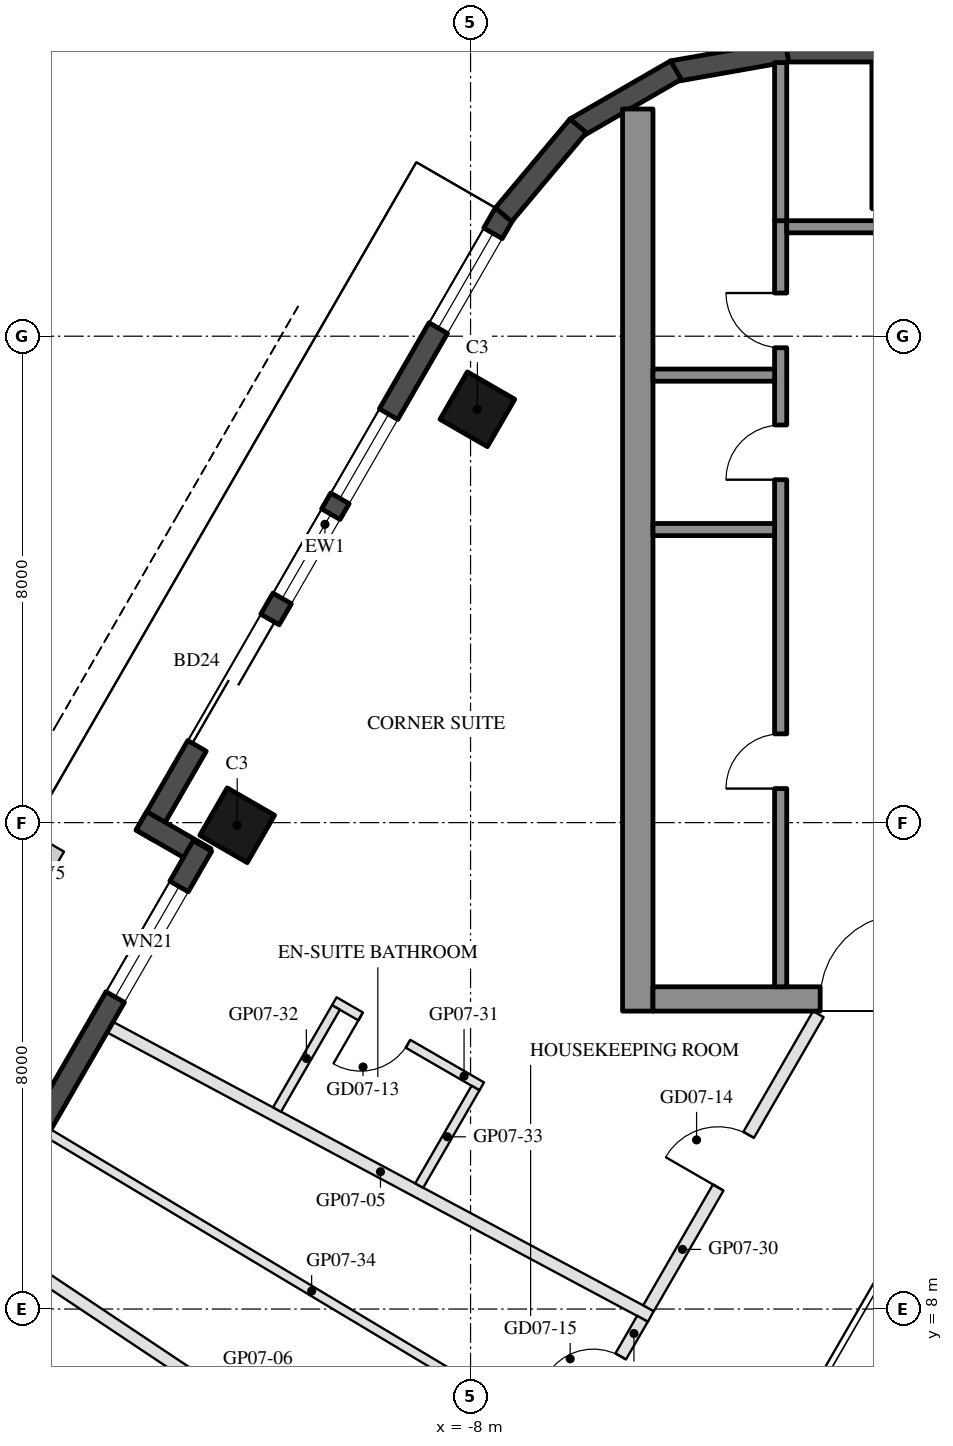
"""IFC4 building model, lengths in metres.
Left out: names, types, materials, properties, quantities, classifications, styles, units other than length and angle.
Written with IfcOpenShell. Run it as: python <this file> out.ifc"""

import sys

from ifc_helpers import new_model, si_unit, direction, frame, frame_2d, origin, origin_2d, place, context, subcontext, project, spatial, rectangle, hollow_rectangle, extrude, element, fill, save


model = new_model("IFC4")
c1 = context("Model", 3, precision=1e-05, world=origin(), true_north=direction((0.0, 1.0)))
c2 = subcontext(c1, "Body", "Model", "MODEL_VIEW")
j1 = project(units=[si_unit("LENGTHUNIT", "METRE"), si_unit("PLANEANGLEUNIT", "RADIAN")], contexts=[c1])
p1 = place(None, origin())
s1 = spatial("IfcSite", under=j1, at=p1, CompositionType="ELEMENT")
p2 = place(p1, origin())
s2 = spatial("IfcBuilding", under=s1, at=p2, CompositionType="ELEMENT")
p3 = place(p2, frame((0.0, 0.0, 94.6)))
s3 = spatial("IfcBuildingStorey", under=s2, at=p3, CompositionType="ELEMENT", Elevation=94.6)
for number, where, z_axis, x_axis in (
    (1, (-7.888, 22.798, 0.0), (0.0, 0.0, 1.0), (0.5, 0.866, 0.0)),
    (2, (-11.838, 15.957, 0.0), (0.0, 0.0, 1.0), (0.5, 0.866, 0.0)),
):
    element("IfcColumn", number, at=place(p3, frame(where, z_axis=z_axis, x_axis=x_axis)), inside=s3, PredefinedType="COLUMN", context=c2, shape_type="SweptSolid", body=[
        extrude(hollow_rectangle(XDim=0.9, YDim=0.9, WallThickness=0.04, at=origin_2d()), origin(), (0.0, 0.0, 1.0), 3.7),
    ])
p4 = place(p3, frame((0.0, 27.3, 0.0), z_axis=(0.0, 0.0, 1.0), x_axis=(1.0, 0.0, 0.0)))
e3 = element("IfcColumn", 3, at=p4, inside=s3, PredefinedType="COLUMN", context=c2, shape_type="SweptSolid", body=[
    extrude(hollow_rectangle(XDim=2.8, YDim=2.4, WallThickness=0.07, at=origin_2d()), origin(), (0.0, 0.0, 1.0), 3.7),
])
p5 = place(p3, frame((-7.441, 26.022, 0.0), z_axis=(0.0, 0.0, 1.0), x_axis=(-0.499992533062, -0.86602971478, 0.0)))
e4 = element("IfcWall", 4, at=p5, inside=s3, PredefinedType="SOLIDWALL", context=c2, shape_type="SweptSolid", body=[
    extrude(rectangle(XDim=11.816, YDim=0.35, at=frame_2d((5.908, 0.0))), origin(), (0.0, 0.0, 1.0), 3.55),
])
p6 = place(p5, frame((0.381, 0.0, 0.3)))
e5 = element("IfcOpeningElement", 5, at=p6, cuts=e4, PredefinedType="OPENING", context=c2, shape_type="SweptSolid", body=[
    extrude(rectangle(XDim=1.8, YDim=2.65, at=frame_2d((0.9, 1.325))), frame((0.0, 0.185, 0.0), z_axis=(0.0, -1.0, 0.0), x_axis=(1.0, 0.0, 0.0)), (0.0, 0.0, 1.0), 0.37),
])
p7 = place(p5, frame((7.716, 0.0, 0.0)))
e6 = element("IfcOpeningElement", 6, at=p7, cuts=e4, PredefinedType="OPENING", context=c2, shape_type="SweptSolid", body=[
    extrude(rectangle(XDim=2.4, YDim=2.4, at=frame_2d((1.2, 1.2))), frame((0.0, 0.185, 0.0), z_axis=(0.0, -1.0, 0.0), x_axis=(1.0, 0.0, 0.0)), (0.0, 0.0, 1.0), 0.37),
])
p8 = place(p5, frame((3.815, 0.0, 0.3)))
e7 = element("IfcOpeningElement", 7, at=p8, cuts=e4, PredefinedType="OPENING", context=c2, shape_type="SweptSolid", body=[
    extrude(rectangle(XDim=1.6, YDim=2.65, at=frame_2d((0.8, 1.325))), frame((0.0, 0.185, 0.0), z_axis=(0.0, -1.0, 0.0), x_axis=(1.0, 0.0, 0.0)), (0.0, 0.0, 1.0), 0.37),
])
p9 = place(p5, frame((5.715, 0.0, 0.3)))
e8 = element("IfcOpeningElement", 8, at=p9, cuts=e4, PredefinedType="OPENING", context=c2, shape_type="SweptSolid", body=[
    extrude(rectangle(XDim=1.6, YDim=2.65, at=frame_2d((0.8, 1.325))), frame((0.0, 0.185, 0.0), z_axis=(0.0, -1.0, 0.0), x_axis=(1.0, 0.0, 0.0)), (0.0, 0.0, 1.0), 0.37),
])
p10 = place(p3, frame((-13.413, 16.029, 0.0), z_axis=(0.0, 0.0, 1.0), x_axis=(0.866005645448, -0.500034220881, 0.0)))
e9 = element("IfcWall", 9, at=p10, inside=s3, PredefinedType="SOLIDWALL", context=c2, shape_type="SweptSolid", body=[
    extrude(rectangle(XDim=1.22, YDim=0.35, at=frame_2d((0.61, 0.0))), origin(), (0.0, 0.0, 1.0), 3.55),
])
p11 = place(p3, frame((-12.409, 15.617, 0.0), z_axis=(0.0, 0.0, 1.0), x_axis=(-0.500003597184, -0.866023326939, 0.0)))
e10 = element("IfcWall", 10, at=p11, inside=s3, PredefinedType="SOLIDWALL", context=c2, shape_type="SweptSolid", body=[
    extrude(rectangle(XDim=6.74, YDim=0.35, at=frame_2d((3.37, 0.0))), origin(), (0.0, 0.0, 1.0), 3.55),
])
p12 = place(p11, frame((0.77, 0.0, 0.3)))
e11 = element("IfcOpeningElement", 11, at=p12, cuts=e10, PredefinedType="OPENING", context=c2, shape_type="SweptSolid", body=[
    extrude(rectangle(XDim=2.1, YDim=2.65, at=frame_2d((1.05, 1.325))), frame((0.0, 0.185, 0.0), z_axis=(0.0, -1.0, 0.0), x_axis=(1.0, 0.0, 0.0)), (0.0, 0.0, 1.0), 0.37),
])
p13 = place(p3, frame((2.829, 28.685, 0.0), z_axis=(0.0, 0.0, 1.0), x_axis=(-1.0, 0.0, 0.0)))
e12 = element("IfcWall", 12, at=p13, inside=s3, PredefinedType="SOLIDWALL", context=c2, shape_type="SweptSolid", body=[
    extrude(rectangle(XDim=5.658, YDim=0.35, at=frame_2d((2.829, 0.0))), origin(), (0.0, 0.0, 1.0), 3.55),
])
for number, where, z_axis, x_axis in (
    (13, (-2.799, 28.688, 0.0), (0.0, 0.0, 1.0), (-0.985, -0.174, 0.0)),
    (14, (-4.623, 28.377, 0.0), (0.0, 0.0, 1.0), (-0.866, -0.5, 0.0)),
):
    element("IfcWall", number, at=place(p3, frame(where, z_axis=z_axis, x_axis=x_axis)), inside=s3, PredefinedType="SOLIDWALL", context=c2, shape_type="SweptSolid", body=[
        extrude(rectangle(XDim=1.91, YDim=0.35, at=frame_2d((0.955, 0.0))), origin(), (0.0, 0.0, 1.0), 3.55),
    ])
p14 = place(p3, frame((-6.23, 27.461, 0.0), z_axis=(0.0, 0.0, 1.0), x_axis=(-0.642808304945, -0.766027077259, 0.0)))
e15 = element("IfcWall", 15, at=p14, inside=s3, PredefinedType="SOLIDWALL", context=c2, shape_type="SweptSolid", body=[
    extrude(rectangle(XDim=1.91, YDim=0.35, at=frame_2d((0.955, 0.0))), origin(), (0.0, 0.0, 1.0), 3.55),
])
p15 = place(p3, frame((-5.25, 12.9, 0.0), z_axis=(0.0, 0.0, 1.0), x_axis=(0.0, 1.0, 0.0)))
e16 = element("IfcWall", 16, at=p15, inside=s3, PredefinedType="SHEAR", context=c2, shape_type="SweptSolid", body=[
    extrude(rectangle(XDim=14.837, YDim=0.5, at=frame_2d((7.418, 0.0))), origin(), (0.0, 0.0, 1.0), 3.5),
])
p16 = place(p3, frame((5.0, 13.1, 0.0), z_axis=(0.0, 0.0, 1.0), x_axis=(-1.0, 0.0, 0.0)))
e17 = element("IfcWall", 17, at=p16, inside=s3, PredefinedType="SHEAR", context=c2, shape_type="SweptSolid", body=[
    extrude(rectangle(XDim=10.0, YDim=0.4, at=frame_2d((5.0, 0.0))), origin(), (0.0, 0.0, 1.0), 3.5),
])
p17 = place(p16, frame((3.55, 0.0, 0.0)))
e18 = element("IfcOpeningElement", 18, at=p17, cuts=e17, PredefinedType="OPENING", context=c2, shape_type="SweptSolid", body=[
    extrude(rectangle(XDim=1.1, YDim=2.1, at=frame_2d((0.55, 1.05))), frame((0.0, 0.21, 0.0), z_axis=(0.0, -1.0, 0.0), x_axis=(1.0, 0.0, 0.0)), (0.0, 0.0, 1.0), 0.42),
])
p18 = place(p16, frame((5.85, 0.0, 0.0)))
e19 = element("IfcOpeningElement", 19, at=p18, cuts=e17, PredefinedType="OPENING", context=c2, shape_type="SweptSolid", body=[
    extrude(rectangle(XDim=1.4, YDim=2.1, at=frame_2d((0.7, 1.05))), frame((0.0, 0.21, 0.0), z_axis=(0.0, -1.0, 0.0), x_axis=(1.0, 0.0, 0.0)), (0.0, 0.0, 1.0), 0.42),
])
p19 = place(p3, frame((-2.9, 13.3, 0.0), z_axis=(0.0, 0.0, 1.0), x_axis=(0.0, 1.0, 0.0)))
e20 = element("IfcWall", 20, at=p19, inside=s3, PredefinedType="SHEAR", context=c2, shape_type="SweptSolid", body=[
    extrude(rectangle(XDim=12.6, YDim=0.2, at=frame_2d((6.3, 0.0))), origin(), (0.0, 0.0, 1.0), 3.5),
])
p20 = place(p19, frame((3.26, 0.0, 0.0)))
e21 = element("IfcOpeningElement", 21, at=p20, cuts=e20, PredefinedType="OPENING", context=c2, shape_type="SweptSolid", body=[
    extrude(rectangle(XDim=0.9, YDim=2.1, at=frame_2d((0.45, 1.05))), frame((0.0, 0.11, 0.0), z_axis=(0.0, -1.0, 0.0), x_axis=(1.0, 0.0, 0.0)), (0.0, 0.0, 1.0), 0.22),
])
p21 = place(p19, frame((8.34, 0.0, 0.0)))
e22 = element("IfcOpeningElement", 22, at=p21, cuts=e20, PredefinedType="OPENING", context=c2, shape_type="SweptSolid", body=[
    extrude(rectangle(XDim=0.9, YDim=2.1, at=frame_2d((0.45, 1.05))), frame((0.0, 0.11, 0.0), z_axis=(0.0, -1.0, 0.0), x_axis=(1.0, 0.0, 0.0)), (0.0, 0.0, 1.0), 0.22),
])
p22 = place(p19, frame((10.51, 0.0, 0.0)))
e23 = element("IfcOpeningElement", 23, at=p22, cuts=e20, PredefinedType="OPENING", context=c2, shape_type="SweptSolid", body=[
    extrude(rectangle(XDim=0.9, YDim=2.1, at=frame_2d((0.45, 1.05))), frame((0.0, 0.11, 0.0), z_axis=(0.0, -1.0, 0.0), x_axis=(1.0, 0.0, 0.0)), (0.0, 0.0, 1.0), 0.22),
])
p23 = place(p3, frame((-0.4, 25.8, 0.0), z_axis=(0.0, 0.0, 1.0), x_axis=(-1.0, 0.0, 0.0)))
e24 = element("IfcWall", 24, at=p23, inside=s3, PredefinedType="SHEAR", context=c2, shape_type="SweptSolid", body=[
    extrude(rectangle(XDim=2.4, YDim=0.2, at=frame_2d((1.2, 0.0))), origin(), (0.0, 0.0, 1.0), 3.5),
])
for number, where, z_axis, x_axis in (
    (25, (-3.0, 20.82, 0.0), (0.0, 0.0, 1.0), (-1.0, 0.0, 0.0)),
    (26, (-3.0, 23.36, 0.0), (0.0, 0.0, 1.0), (-1.0, 0.0, 0.0)),
):
    element("IfcWall", number, at=place(p3, frame(where, z_axis=z_axis, x_axis=x_axis)), inside=s3, PredefinedType="SHEAR", context=c2, shape_type="SweptSolid", body=[
        extrude(rectangle(XDim=2.0, YDim=0.2, at=frame_2d((1.0, 0.0))), origin(), (0.0, 0.0, 1.0), 3.5),
    ])
p24 = place(p3, frame((-2.9, 25.9, 0.0), z_axis=(0.0, 0.0, 1.0), x_axis=(0.0, 1.0, 0.0)))
e27 = element("IfcWall", 27, at=p24, inside=s3, PredefinedType="SHEAR", context=c2, shape_type="SweptSolid", body=[
    extrude(rectangle(XDim=2.6, YDim=0.2, at=frame_2d((1.3, 0.0))), origin(), (0.0, 0.0, 1.0), 3.5),
])
p25 = place(p3, frame((-13.928, 12.636, 0.0), z_axis=(0.0, 0.0, 1.0), x_axis=(0.881791431821, -0.471639555981, 0.0)))
e28 = element("IfcWall", 28, at=p25, inside=s3, PredefinedType="PARTITIONING", context=c2, shape_type="SweptSolid", body=[
    extrude(rectangle(XDim=10.085, YDim=0.2, at=frame_2d((5.042, 0.0))), origin(), (0.0, 0.0, 1.0), 2.95),
])
p26 = place(p3, frame((-15.447, 8.806, 0.0), z_axis=(0.0, 0.0, 1.0), x_axis=(0.831801127359, -0.55507376494, 0.0)))
e29 = element("IfcWall", 29, at=p26, inside=s3, PredefinedType="PARTITIONING", context=c2, shape_type="SweptSolid", body=[
    extrude(rectangle(XDim=9.5, YDim=0.2, at=frame_2d((4.75, 0.0))), origin(), (0.0, 0.0, 1.0), 2.95),
])
p27 = place(p3, frame((-5.073, 8.013, 0.0), z_axis=(0.0, 0.0, 1.0), x_axis=(0.500003731568, 0.866023249352, 0.0)))
e30 = element("IfcWall", 30, at=p27, inside=s3, PredefinedType="PARTITIONING", context=c2, shape_type="SweptSolid", body=[
    extrude(rectangle(XDim=5.585, YDim=0.2, at=frame_2d((2.792, 0.0))), origin(), (0.0, 0.0, 1.0), 2.95),
])
p28 = place(p27, frame((2.292, 0.0, 0.0)))
e31 = element("IfcOpeningElement", 31, at=p28, cuts=e30, PredefinedType="OPENING", context=c2, shape_type="SweptSolid", body=[
    extrude(rectangle(XDim=1.0, YDim=2.1, at=frame_2d((0.5, 1.05))), frame((0.0, 0.11, 0.0), z_axis=(0.0, -1.0, 0.0), x_axis=(1.0, 0.0, 0.0)), (0.0, 0.0, 1.0), 0.22),
])
p29 = place(p3, frame((-7.816, 11.662, 0.0), z_axis=(0.0, 0.0, 1.0), x_axis=(-0.865996816683, 0.500049511043, 0.0)))
e32 = element("IfcWall", 32, at=p29, inside=s3, PredefinedType="PARTITIONING", context=c2, shape_type="SweptSolid", body=[
    extrude(rectangle(XDim=2.8, YDim=0.15, at=frame_2d((1.4, 0.0))), origin(), (0.0, 0.0, 1.0), 3.55),
])
p30 = place(p29, frame((1.4, 0.0, 0.0)))
e33 = element("IfcOpeningElement", 33, at=p30, cuts=e32, PredefinedType="OPENING", context=c2, shape_type="SweptSolid", body=[
    extrude(rectangle(XDim=0.9, YDim=2.1, at=frame_2d((0.45, 1.05))), frame((0.0, 0.085, 0.0), z_axis=(0.0, -1.0, 0.0), x_axis=(1.0, 0.0, 0.0)), (0.0, 0.0, 1.0), 0.17),
])
p31 = place(p3, frame((-10.213, 12.96, 0.0), z_axis=(0.0, 0.0, 1.0), x_axis=(-0.500013181875, -0.866017793092, 0.0)))
e34 = element("IfcWall", 34, at=p31, inside=s3, PredefinedType="PARTITIONING", context=c2, shape_type="SweptSolid", body=[
    extrude(rectangle(XDim=1.938, YDim=0.15, at=frame_2d((0.969, 0.0))), origin(), (0.0, 0.0, 1.0), 3.55),
])
p32 = place(p3, frame((-7.918, 11.635, 0.0), z_axis=(0.0, 0.0, 1.0), x_axis=(-0.499924019097, -0.866069266935, 0.0)))
e35 = element("IfcWall", 35, at=p32, inside=s3, PredefinedType="PARTITIONING", context=c2, shape_type="SweptSolid", body=[
    extrude(rectangle(XDim=1.852, YDim=0.15, at=frame_2d((0.926, 0.0))), origin(), (0.0, 0.0, 1.0), 3.55),
])
p33 = place(p3, frame((-14.937, 10.888, 0.0), z_axis=(0.0, 0.0, 1.0), x_axis=(0.857798338883, -0.513986390685, 0.0)))
e36 = element("IfcWall", 36, at=p33, inside=s3, PredefinedType="PARTITIONING", context=c2, shape_type="SweptSolid", body=[
    extrude(rectangle(XDim=10.081, YDim=0.15, at=frame_2d((5.041, 0.0))), origin(), (0.0, 0.0, 1.0), 2.96),
])
p34 = place(p3, frame((-6.338, 5.823, 0.0), z_axis=(0.0, 0.0, 1.0), x_axis=(0.499982502246, 0.866035505882, 0.0)))
e37 = element("IfcWall", 37, at=p34, inside=s3, PredefinedType="PARTITIONING", context=c2, shape_type="SweptSolid", body=[
    extrude(rectangle(XDim=2.33, YDim=0.2, at=frame_2d((1.165, 0.0))), origin(), (0.0, 0.0, 1.0), 2.95),
])
p35 = place(p34, frame((0.715, 0.0, 0.0)))
e38 = element("IfcOpeningElement", 38, at=p35, cuts=e37, PredefinedType="OPENING", context=c2, shape_type="SweptSolid", body=[
    extrude(rectangle(XDim=0.9, YDim=2.1, at=frame_2d((0.45, 1.05))), frame((0.0, 0.11, 0.0), z_axis=(0.0, -1.0, 0.0), x_axis=(1.0, 0.0, 0.0)), (0.0, 0.0, 1.0), 0.22),
])
p36 = place(p6, origin())
e39 = element("IfcWindow", 39, at=p36, inside=s3, PartitioningType="SINGLE_PANEL", PredefinedType="WINDOW", context=c2, shape_type="SweptSolid", body=[
    extrude(rectangle(XDim=1.8, YDim=2.65, at=frame_2d((0.9, 1.325))), frame((0.0, 0.03, 0.0), z_axis=(0.0, -1.0, 0.0), x_axis=(1.0, 0.0, 0.0)), (0.0, 0.0, 1.0), 0.06),
])
fill(e5, e39)
p37 = place(p7, frame((2.4, 0.0, 0.0), z_axis=(0.0, 0.0, 1.0), x_axis=(-1.0, 0.0, 0.0)))
e40 = element("IfcDoor", 40, at=p37, inside=s3, OperationType="SLIDING_TO_LEFT", PredefinedType="DOOR", context=c2, shape_type="SweptSolid", body=[
    extrude(rectangle(XDim=2.4, YDim=2.4, at=frame_2d((1.2, 1.2))), frame((0.0, 0.025, 0.0), z_axis=(0.0, -1.0, 0.0), x_axis=(1.0, 0.0, 0.0)), (0.0, 0.0, 1.0), 0.05),
])
fill(e6, e40)
p38 = place(p8, origin())
e41 = element("IfcWindow", 41, at=p38, inside=s3, PartitioningType="SINGLE_PANEL", PredefinedType="WINDOW", context=c2, shape_type="SweptSolid", body=[
    extrude(rectangle(XDim=1.6, YDim=2.65, at=frame_2d((0.8, 1.325))), frame((0.0, 0.03, 0.0), z_axis=(0.0, -1.0, 0.0), x_axis=(1.0, 0.0, 0.0)), (0.0, 0.0, 1.0), 0.06),
])
fill(e7, e41)
p39 = place(p9, origin())
e42 = element("IfcWindow", 42, at=p39, inside=s3, PartitioningType="SINGLE_PANEL", PredefinedType="WINDOW", context=c2, shape_type="SweptSolid", body=[
    extrude(rectangle(XDim=1.6, YDim=2.65, at=frame_2d((0.8, 1.325))), frame((0.0, 0.03, 0.0), z_axis=(0.0, -1.0, 0.0), x_axis=(1.0, 0.0, 0.0)), (0.0, 0.0, 1.0), 0.06),
])
fill(e8, e42)
p40 = place(p12, origin())
e43 = element("IfcWindow", 43, at=p40, inside=s3, PartitioningType="SINGLE_PANEL", PredefinedType="WINDOW", context=c2, shape_type="SweptSolid", body=[
    extrude(rectangle(XDim=2.1, YDim=2.65, at=frame_2d((1.05, 1.325))), frame((0.0, 0.03, 0.0), z_axis=(0.0, -1.0, 0.0), x_axis=(1.0, 0.0, 0.0)), (0.0, 0.0, 1.0), 0.06),
])
fill(e11, e43)
p41 = place(p20, origin())
e44 = element("IfcDoor", 44, at=p41, inside=s3, OperationType="SINGLE_SWING_LEFT", PredefinedType="DOOR", context=c2, shape_type="SweptSolid", body=[
    extrude(rectangle(XDim=0.9, YDim=2.1, at=frame_2d((0.45, 1.05))), frame((0.0, 0.025, 0.0), z_axis=(0.0, -1.0, 0.0), x_axis=(1.0, 0.0, 0.0)), (0.0, 0.0, 1.0), 0.05),
])
fill(e21, e44)
p42 = place(p21, origin())
e45 = element("IfcDoor", 45, at=p42, inside=s3, OperationType="SINGLE_SWING_LEFT", PredefinedType="DOOR", context=c2, shape_type="SweptSolid", body=[
    extrude(rectangle(XDim=0.9, YDim=2.1, at=frame_2d((0.45, 1.05))), frame((0.0, 0.025, 0.0), z_axis=(0.0, -1.0, 0.0), x_axis=(1.0, 0.0, 0.0)), (0.0, 0.0, 1.0), 0.05),
])
fill(e22, e45)
p43 = place(p22, origin())
e46 = element("IfcDoor", 46, at=p43, inside=s3, OperationType="SINGLE_SWING_RIGHT", PredefinedType="DOOR", context=c2, shape_type="SweptSolid", body=[
    extrude(rectangle(XDim=0.9, YDim=2.1, at=frame_2d((0.45, 1.05))), frame((0.0, 0.025, 0.0), z_axis=(0.0, -1.0, 0.0), x_axis=(1.0, 0.0, 0.0)), (0.0, 0.0, 1.0), 0.05),
])
fill(e23, e46)
p44 = place(p18, frame((1.4, 0.0, 0.0), z_axis=(0.0, 0.0, 1.0), x_axis=(-1.0, 0.0, 0.0)))
e47 = element("IfcDoor", 47, at=p44, inside=s3, OperationType="DOUBLE_DOOR_SINGLE_SWING", PredefinedType="DOOR", context=c2, shape_type="SweptSolid", body=[
    extrude(rectangle(XDim=1.4, YDim=2.1, at=frame_2d((0.7, 1.05))), frame((0.0, 0.025, 0.0), z_axis=(0.0, -1.0, 0.0), x_axis=(1.0, 0.0, 0.0)), (0.0, 0.0, 1.0), 0.05),
])
fill(e19, e47)
p45 = place(p30, origin())
e48 = element("IfcDoor", 48, at=p45, inside=s3, OperationType="SINGLE_SWING_RIGHT", PredefinedType="DOOR", context=c2, shape_type="SweptSolid", body=[
    extrude(rectangle(XDim=0.9, YDim=2.1, at=frame_2d((0.45, 1.05))), frame((0.0, 0.025, 0.0), z_axis=(0.0, -1.0, 0.0), x_axis=(1.0, 0.0, 0.0)), (0.0, 0.0, 1.0), 0.05),
])
fill(e33, e48)
p46 = place(p28, origin())
e49 = element("IfcDoor", 49, at=p46, inside=s3, OperationType="SINGLE_SWING_LEFT", PredefinedType="DOOR", context=c2, shape_type="SweptSolid", body=[
    extrude(rectangle(XDim=1.0, YDim=2.1, at=frame_2d((0.5, 1.05))), frame((0.0, 0.025, 0.0), z_axis=(0.0, -1.0, 0.0), x_axis=(1.0, 0.0, 0.0)), (0.0, 0.0, 1.0), 0.05),
])
fill(e31, e49)
p47 = place(p35, origin())
e50 = element("IfcDoor", 50, at=p47, inside=s3, OperationType="SINGLE_SWING_LEFT", PredefinedType="DOOR", context=c2, shape_type="SweptSolid", body=[
    extrude(rectangle(XDim=0.9, YDim=2.1, at=frame_2d((0.45, 1.05))), frame((0.0, 0.025, 0.0), z_axis=(0.0, -1.0, 0.0), x_axis=(1.0, 0.0, 0.0)), (0.0, 0.0, 1.0), 0.05),
])
fill(e38, e50)
save(model, sys.argv[1])
